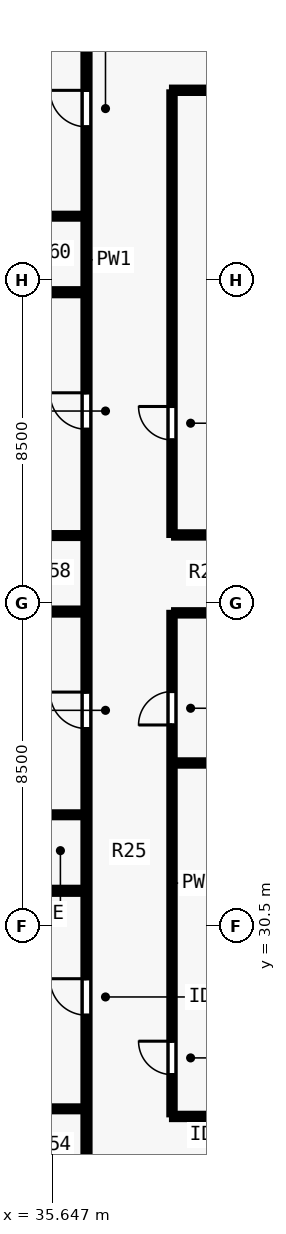
"""IFC4 building model, lengths in metres.
Left out: names, types, materials, properties, quantities, classifications, styles, units other than length and angle.
Written with IfcOpenShell. Run it as: python <this file> out.ifc"""

import sys

from ifc_helpers import new_model, si_unit, direction, frame, frame_2d, origin, place, context, subcontext, project, spatial, rectangle, extrude, element, fill, save


model = new_model("IFC4")
c1 = context("Model", 3, precision=1e-05, world=origin(), true_north=direction((0.0, 1.0)))
c2 = subcontext(c1, "Body", "Model", "MODEL_VIEW")
j1 = project(units=[si_unit("LENGTHUNIT", "METRE"), si_unit("PLANEANGLEUNIT", "RADIAN")], contexts=[c1])
p1 = place(None, origin())
s1 = spatial("IfcSite", under=j1, at=p1, CompositionType="ELEMENT")
p2 = place(p1, origin())
s2 = spatial("IfcBuilding", under=s1, at=p2, CompositionType="ELEMENT")
p3 = place(p2, frame((0.0, 0.0, 76.0)))
s3 = spatial("IfcBuildingStorey", under=s2, at=p3, CompositionType="ELEMENT", Elevation=76.0)
p4 = place(p3, frame((36.55, 23.315, 0.0), z_axis=(0.0, 0.0, 1.0), x_axis=(0.0, 1.0, 0.0)))
e1 = element("IfcWall", 1, at=p4, inside=s3, PredefinedType="PARTITIONING", context=c2, shape_type="SweptSolid", body=[
    extrude(rectangle(XDim=31.37, YDim=0.16, at=frame_2d((15.685, 0.0))), origin(), (0.0, 0.0, 1.0), 3.28),
])
p5 = place(p4, frame((4.848, 0.0, 0.0)))
e2 = element("IfcOpeningElement", 2, at=p5, cuts=e1, PredefinedType="OPENING", context=c2, shape_type="SweptSolid", body=[
    extrude(rectangle(XDim=0.96, YDim=2.15, at=frame_2d((0.48, 1.075))), frame((0.0, 0.09, 0.0), z_axis=(0.0, -1.0, 0.0), x_axis=(1.0, 0.0, 0.0)), (0.0, 0.0, 1.0), 0.18),
])
p6 = place(p4, frame((12.39, 0.0, 0.0)))
e3 = element("IfcOpeningElement", 3, at=p6, cuts=e1, PredefinedType="OPENING", context=c2, shape_type="SweptSolid", body=[
    extrude(rectangle(XDim=0.96, YDim=2.15, at=frame_2d((0.48, 1.075))), frame((0.0, 0.09, 0.0), z_axis=(0.0, -1.0, 0.0), x_axis=(1.0, 0.0, 0.0)), (0.0, 0.0, 1.0), 0.18),
])
p7 = place(p4, frame((20.265, 0.0, 0.0)))
e4 = element("IfcOpeningElement", 4, at=p7, cuts=e1, PredefinedType="OPENING", context=c2, shape_type="SweptSolid", body=[
    extrude(rectangle(XDim=0.96, YDim=2.15, at=frame_2d((0.48, 1.075))), frame((0.0, 0.09, 0.0), z_axis=(0.0, -1.0, 0.0), x_axis=(1.0, 0.0, 0.0)), (0.0, 0.0, 1.0), 0.18),
])
p8 = place(p4, frame((28.223, 0.0, 0.0)))
e5 = element("IfcOpeningElement", 5, at=p8, cuts=e1, PredefinedType="OPENING", context=c2, shape_type="SweptSolid", body=[
    extrude(rectangle(XDim=0.96, YDim=2.15, at=frame_2d((0.48, 1.075))), frame((0.0, 0.09, 0.0), z_axis=(0.0, -1.0, 0.0), x_axis=(1.0, 0.0, 0.0)), (0.0, 0.0, 1.0), 0.18),
])
p9 = place(p3, frame((38.8, 25.5, 0.0), z_axis=(0.0, 0.0, 1.0), x_axis=(1.0, 0.0, 0.0)))
e6 = element("IfcWall", 6, at=p9, inside=s3, PredefinedType="PARTITIONING", context=c2, shape_type="SweptSolid", body=[
    extrude(rectangle(XDim=26.4, YDim=0.14, at=frame_2d((13.2, 0.0))), origin(), (0.0, 0.0, 1.0), 3.28),
])
p10 = place(p9, frame((2.2, 0.0, 0.0)))
e7 = element("IfcOpeningElement", 7, at=p10, cuts=e6, PredefinedType="OPENING", context=c2, shape_type="SweptSolid", body=[
    extrude(rectangle(XDim=0.96, YDim=2.12, at=frame_2d((0.48, 1.06))), frame((0.0, 0.08, 0.0), z_axis=(0.0, -1.0, 0.0), x_axis=(1.0, 0.0, 0.0)), (0.0, 0.0, 1.0), 0.16),
])
p11 = place(p9, frame((15.2, 0.0, 0.0)))
e8 = element("IfcOpeningElement", 8, at=p11, cuts=e6, PredefinedType="OPENING", context=c2, shape_type="SweptSolid", body=[
    extrude(rectangle(XDim=0.96, YDim=2.12, at=frame_2d((0.48, 1.06))), frame((0.0, 0.08, 0.0), z_axis=(0.0, -1.0, 0.0), x_axis=(1.0, 0.0, 0.0)), (0.0, 0.0, 1.0), 0.16),
])
p12 = place(p3, frame((38.8, 52.5, 0.0), z_axis=(0.0, 0.0, 1.0), x_axis=(1.0, 0.0, 0.0)))
e9 = element("IfcWall", 9, at=p12, inside=s3, PredefinedType="PARTITIONING", context=c2, shape_type="SweptSolid", body=[
    extrude(rectangle(XDim=26.4, YDim=0.14, at=frame_2d((13.2, 0.0))), origin(), (0.0, 0.0, 1.0), 3.28),
])
p13 = place(p12, frame((3.2, 0.0, 0.0)))
e10 = element("IfcOpeningElement", 10, at=p13, cuts=e9, PredefinedType="OPENING", context=c2, shape_type="SweptSolid", body=[
    extrude(rectangle(XDim=0.96, YDim=2.12, at=frame_2d((0.48, 1.06))), frame((0.0, 0.08, 0.0), z_axis=(0.0, -1.0, 0.0), x_axis=(1.0, 0.0, 0.0)), (0.0, 0.0, 1.0), 0.16),
])
p14 = place(p12, frame((19.2, 0.0, 0.0)))
e11 = element("IfcOpeningElement", 11, at=p14, cuts=e9, PredefinedType="OPENING", context=c2, shape_type="SweptSolid", body=[
    extrude(rectangle(XDim=0.96, YDim=2.12, at=frame_2d((0.48, 1.06))), frame((0.0, 0.08, 0.0), z_axis=(0.0, -1.0, 0.0), x_axis=(1.0, 0.0, 0.0)), (0.0, 0.0, 1.0), 0.16),
])
p15 = place(p3, frame((38.8, 25.555, 0.0), z_axis=(0.0, 0.0, 1.0), x_axis=(0.0, 1.0, 0.0)))
e12 = element("IfcWall", 12, at=p15, inside=s3, PredefinedType="PARTITIONING", context=c2, shape_type="SweptSolid", body=[
    extrude(rectangle(XDim=13.195, YDim=0.14, at=frame_2d((6.598, 0.0))), origin(), (0.0, 0.0, 1.0), 3.28),
])
p16 = place(p15, frame((1.045, 0.0, 0.0)))
e13 = element("IfcOpeningElement", 13, at=p16, cuts=e12, PredefinedType="OPENING", context=c2, shape_type="SweptSolid", body=[
    extrude(rectangle(XDim=0.88, YDim=2.1, at=frame_2d((0.44, 1.05))), frame((0.0, 0.08, 0.0), z_axis=(0.0, -1.0, 0.0), x_axis=(1.0, 0.0, 0.0)), (0.0, 0.0, 1.0), 0.16),
])
p17 = place(p15, frame((10.245, 0.0, 0.0)))
e14 = element("IfcOpeningElement", 14, at=p17, cuts=e12, PredefinedType="OPENING", context=c2, shape_type="SweptSolid", body=[
    extrude(rectangle(XDim=0.88, YDim=2.1, at=frame_2d((0.44, 1.05))), frame((0.0, 0.08, 0.0), z_axis=(0.0, -1.0, 0.0), x_axis=(1.0, 0.0, 0.0)), (0.0, 0.0, 1.0), 0.16),
])
p18 = place(p3, frame((38.8, 40.8, 0.0), z_axis=(0.0, 0.0, 1.0), x_axis=(0.0, 1.0, 0.0)))
e15 = element("IfcWall", 15, at=p18, inside=s3, PredefinedType="PARTITIONING", context=c2, shape_type="SweptSolid", body=[
    extrude(rectangle(XDim=11.645, YDim=0.14, at=frame_2d((5.823, 0.0))), origin(), (0.0, 0.0, 1.0), 3.28),
])
p19 = place(p18, frame((2.5, 0.0, 0.0)))
e16 = element("IfcOpeningElement", 16, at=p19, cuts=e15, PredefinedType="OPENING", context=c2, shape_type="SweptSolid", body=[
    extrude(rectangle(XDim=0.88, YDim=2.1, at=frame_2d((0.44, 1.05))), frame((0.0, 0.08, 0.0), z_axis=(0.0, -1.0, 0.0), x_axis=(1.0, 0.0, 0.0)), (0.0, 0.0, 1.0), 0.16),
])
for number, where, z_axis, x_axis in (
    (17, (38.855, 38.75, 0.0), (0.0, 0.0, 1.0), (1.0, 0.0, 0.0)),
    (18, (38.855, 40.8, 0.0), (0.0, 0.0, 1.0), (1.0, 0.0, 0.0)),
    (19, (38.855, 34.8, 0.0), (0.0, 0.0, 1.0), (1.0, 0.0, 0.0)),
):
    element("IfcWall", number, at=place(p3, frame(where, z_axis=z_axis, x_axis=x_axis)), inside=s3, PredefinedType="PARTITIONING", context=c2, shape_type="SweptSolid", body=[
        extrude(rectangle(XDim=4.385, YDim=0.14, at=frame_2d((2.192, 0.0))), origin(), (0.0, 0.0, 1.0), 3.28),
    ])
p20 = place(p3, frame((34.25, 25.7, 0.0), z_axis=(0.0, 0.0, 1.0), x_axis=(1.0, 0.0, 0.0)))
e20 = element("IfcWall", 20, at=p20, inside=s3, PredefinedType="PLUMBINGWALL", context=c2, shape_type="SweptSolid", body=[
    extrude(rectangle(XDim=2.235, YDim=0.13, at=frame_2d((1.118, 0.0))), origin(), (0.0, 0.0, 1.0), 3.28),
])
p21 = place(p3, frame((26.845, 31.437, 0.0), z_axis=(0.0, 0.0, 1.0), x_axis=(1.0, 0.0, 0.0)))
e21 = element("IfcWall", 21, at=p21, inside=s3, PredefinedType="PARTITIONING", context=c2, shape_type="SweptSolid", body=[
    extrude(rectangle(XDim=9.64, YDim=0.16, at=frame_2d((4.82, 0.0))), origin(), (0.0, 0.0, 1.0), 3.28),
])
p22 = place(p3, frame((34.25, 33.437, 0.0), z_axis=(0.0, 0.0, 1.0), x_axis=(1.0, 0.0, 0.0)))
e22 = element("IfcWall", 22, at=p22, inside=s3, PredefinedType="PLUMBINGWALL", context=c2, shape_type="SweptSolid", body=[
    extrude(rectangle(XDim=2.235, YDim=0.13, at=frame_2d((1.118, 0.0))), origin(), (0.0, 0.0, 1.0), 3.28),
])
p23 = place(p3, frame((26.845, 38.784, 0.0), z_axis=(0.0, 0.0, 1.0), x_axis=(1.0, 0.0, 0.0)))
e23 = element("IfcWall", 23, at=p23, inside=s3, PredefinedType="PARTITIONING", context=c2, shape_type="SweptSolid", body=[
    extrude(rectangle(XDim=9.64, YDim=0.16, at=frame_2d((4.82, 0.0))), origin(), (0.0, 0.0, 1.0), 2.849),
])
p24 = place(p3, frame((34.25, 40.784, 0.0), z_axis=(0.0, 0.0, 1.0), x_axis=(1.0, 0.0, 0.0)))
e24 = element("IfcWall", 24, at=p24, inside=s3, PredefinedType="PLUMBINGWALL", context=c2, shape_type="SweptSolid", body=[
    extrude(rectangle(XDim=2.235, YDim=0.13, at=frame_2d((1.118, 0.0))), origin(), (0.0, 0.0, 1.0), 2.849),
])
p25 = place(p3, frame((26.845, 47.187, 0.0), z_axis=(0.0, 0.0, 1.0), x_axis=(1.0, 0.0, 0.0)))
e25 = element("IfcWall", 25, at=p25, inside=s3, PredefinedType="PARTITIONING", context=c2, shape_type="SweptSolid", body=[
    extrude(rectangle(XDim=9.64, YDim=0.16, at=frame_2d((4.82, 0.0))), origin(), (0.0, 0.0, 1.0), 3.28),
])
p26 = place(p3, frame((34.25, 49.187, 0.0), z_axis=(0.0, 0.0, 1.0), x_axis=(1.0, 0.0, 0.0)))
e26 = element("IfcWall", 26, at=p26, inside=s3, PredefinedType="PLUMBINGWALL", context=c2, shape_type="SweptSolid", body=[
    extrude(rectangle(XDim=2.235, YDim=0.13, at=frame_2d((1.118, 0.0))), origin(), (0.0, 0.0, 1.0), 3.28),
])
p27 = place(p16, origin())
e27 = element("IfcDoor", 27, at=p27, inside=s3, OperationType="SINGLE_SWING_RIGHT", PredefinedType="DOOR", context=c2, shape_type="SweptSolid", body=[
    extrude(rectangle(XDim=0.88, YDim=2.1, at=frame_2d((0.44, 1.05))), frame((0.0, 0.025, 0.0), z_axis=(0.0, -1.0, 0.0), x_axis=(1.0, 0.0, 0.0)), (0.0, 0.0, 1.0), 0.05),
])
fill(e13, e27)
p28 = place(p17, origin())
e28 = element("IfcDoor", 28, at=p28, inside=s3, OperationType="SINGLE_SWING_LEFT", PredefinedType="DOOR", context=c2, shape_type="SweptSolid", body=[
    extrude(rectangle(XDim=0.88, YDim=2.1, at=frame_2d((0.44, 1.05))), frame((0.0, 0.025, 0.0), z_axis=(0.0, -1.0, 0.0), x_axis=(1.0, 0.0, 0.0)), (0.0, 0.0, 1.0), 0.05),
])
fill(e14, e28)
p29 = place(p19, origin())
e29 = element("IfcDoor", 29, at=p29, inside=s3, OperationType="SINGLE_SWING_RIGHT", PredefinedType="DOOR", context=c2, shape_type="SweptSolid", body=[
    extrude(rectangle(XDim=0.88, YDim=2.1, at=frame_2d((0.44, 1.05))), frame((0.0, 0.025, 0.0), z_axis=(0.0, -1.0, 0.0), x_axis=(1.0, 0.0, 0.0)), (0.0, 0.0, 1.0), 0.05),
])
fill(e16, e29)
p30 = place(p5, origin())
e30 = element("IfcDoor", 30, at=p30, inside=s3, OperationType="SINGLE_SWING_RIGHT", PredefinedType="DOOR", context=c2, shape_type="SweptSolid", body=[
    extrude(rectangle(XDim=0.96, YDim=2.15, at=frame_2d((0.48, 1.075))), frame((0.0, 0.025, 0.0), z_axis=(0.0, -1.0, 0.0), x_axis=(1.0, 0.0, 0.0)), (0.0, 0.0, 1.0), 0.05),
])
fill(e2, e30)
p31 = place(p6, origin())
e31 = element("IfcDoor", 31, at=p31, inside=s3, OperationType="SINGLE_SWING_RIGHT", PredefinedType="DOOR", context=c2, shape_type="SweptSolid", body=[
    extrude(rectangle(XDim=0.96, YDim=2.15, at=frame_2d((0.48, 1.075))), frame((0.0, 0.025, 0.0), z_axis=(0.0, -1.0, 0.0), x_axis=(1.0, 0.0, 0.0)), (0.0, 0.0, 1.0), 0.05),
])
fill(e3, e31)
p32 = place(p7, origin())
e32 = element("IfcDoor", 32, at=p32, inside=s3, OperationType="SINGLE_SWING_RIGHT", PredefinedType="DOOR", context=c2, shape_type="SweptSolid", body=[
    extrude(rectangle(XDim=0.96, YDim=2.15, at=frame_2d((0.48, 1.075))), frame((0.0, 0.025, 0.0), z_axis=(0.0, -1.0, 0.0), x_axis=(1.0, 0.0, 0.0)), (0.0, 0.0, 1.0), 0.05),
])
fill(e4, e32)
p33 = place(p8, origin())
e33 = element("IfcDoor", 33, at=p33, inside=s3, OperationType="SINGLE_SWING_RIGHT", PredefinedType="DOOR", context=c2, shape_type="SweptSolid", body=[
    extrude(rectangle(XDim=0.96, YDim=2.15, at=frame_2d((0.48, 1.075))), frame((0.0, 0.025, 0.0), z_axis=(0.0, -1.0, 0.0), x_axis=(1.0, 0.0, 0.0)), (0.0, 0.0, 1.0), 0.05),
])
fill(e5, e33)
save(model, sys.argv[1])
